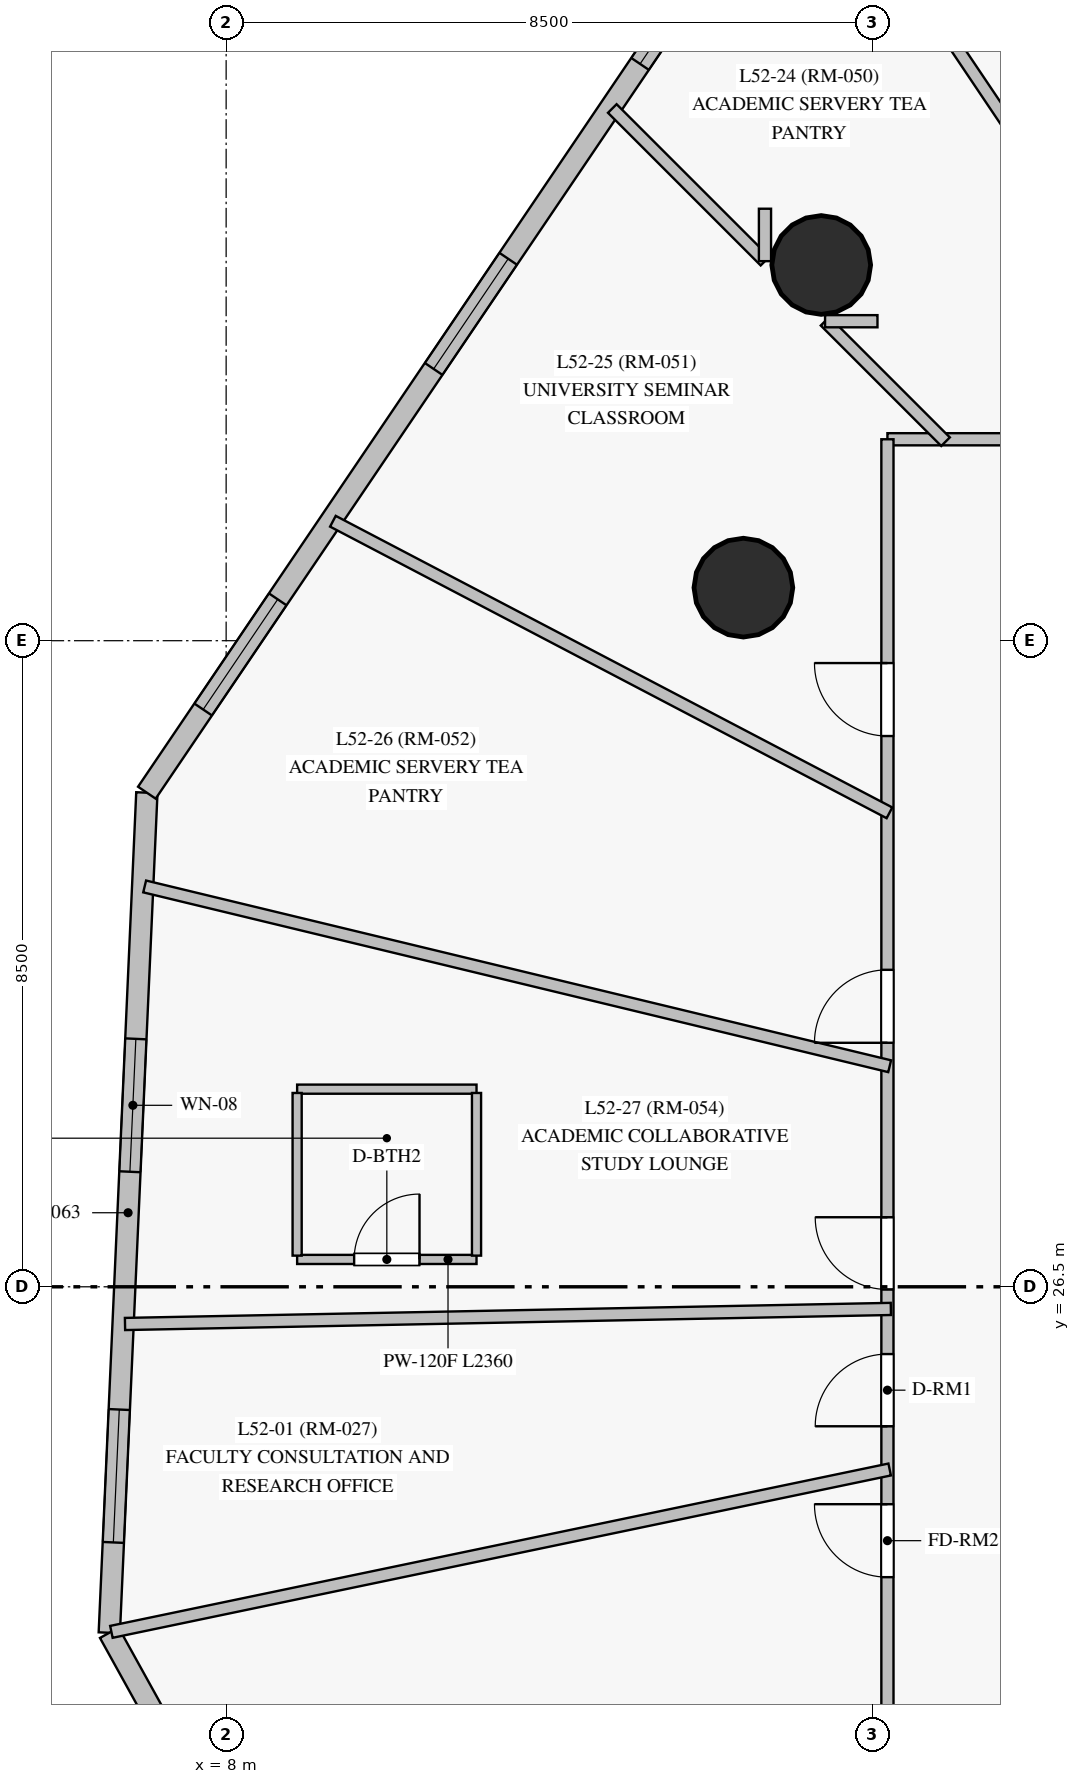
"""IFC4 building model, lengths in metres.
Left out: names, types, materials, properties, quantities, classifications, styles, units other than length and angle.
Written with IfcOpenShell. Run it as: python <this file> out.ifc"""

import sys

from ifc_helpers import new_model, si_unit, direction, frame, frame_2d, origin, origin_with_axes, origin_2d, place, context, subcontext, project, spatial, rectangle, circle, extrude, source, transform, mapped, element, fill, save


model = new_model("IFC4")
c1 = context("Model", 3, precision=1e-05, world=origin(), true_north=direction((0.0, 1.0)))
c2 = subcontext(c1, "Body", "Model", "MODEL_VIEW")
j1 = project(units=[si_unit("LENGTHUNIT", "METRE"), si_unit("PLANEANGLEUNIT", "RADIAN")], contexts=[c1])
p1 = place(None, origin())
s1 = spatial("IfcSite", under=j1, at=p1, CompositionType="ELEMENT")
p2 = place(p1, origin())
s2 = spatial("IfcBuilding", under=s1, at=p2, CompositionType="ELEMENT")
p3 = place(p2, frame((0.0, 0.0, 180.95)))
s3 = spatial("IfcBuildingStorey", under=s2, at=p3, CompositionType="ELEMENT", Elevation=180.95)
m1 = source(origin_with_axes(), c2, "Body", "SweptSolid", [
    extrude(circle(Radius=0.65, at=origin_2d()), origin(), (0.0, 0.0, 1.0), 3.05),
])
for number, where, z_axis, x_axis in (
    (1, (15.829, 39.943, 0.0), (0.0, 0.0, 1.0), (1.0, 0.0, 0.0)),
    (2, (14.805, 35.698, 0.0), (0.0, 0.0, 1.0), (1.0, 0.0, 0.0)),
):
    element("IfcColumn", number, at=place(p3, frame(where, z_axis=z_axis, x_axis=x_axis)), inside=s3, PredefinedType="COLUMN", context=c2, shape_type="MappedRepresentation", body=[
        mapped(m1, transform((0.0, 0.0, 0.0), scale=1.0)),
    ])
p4 = place(p3, frame((6.957, 33.0, 0.0), z_axis=(0.0, 0.0, 1.0), x_axis=(-0.04466588637, -0.999001981277, 0.0)))
e3 = element("IfcWall", 3, at=p4, inside=s3, PredefinedType="SOLIDWALL", context=c2, shape_type="SweptSolid", body=[
    extrude(rectangle(XDim=11.063, YDim=0.28, at=frame_2d((5.531, 0.0))), origin(), (0.0, 0.0, 1.0), 2.825),
])
p5 = place(p4, frame((3.242, 0.0, 0.85)))
e4 = element("IfcOpeningElement", 4, at=p5, cuts=e3, PredefinedType="OPENING", context=c2, shape_type="SweptSolid", body=[
    extrude(rectangle(XDim=1.75, YDim=1.65, at=frame_2d((0.875, 0.825))), frame((0.0, 0.15, 0.0), z_axis=(0.0, -1.0, 0.0), x_axis=(1.0, 0.0, 0.0)), (0.0, 0.0, 1.0), 0.3),
])
p6 = place(p4, frame((8.123, 0.0, 0.85)))
e5 = element("IfcOpeningElement", 5, at=p6, cuts=e3, PredefinedType="OPENING", context=c2, shape_type="SweptSolid", body=[
    extrude(rectangle(XDim=1.75, YDim=1.65, at=frame_2d((0.875, 0.825))), frame((0.0, 0.15, 0.0), z_axis=(0.0, -1.0, 0.0), x_axis=(1.0, 0.0, 0.0)), (0.0, 0.0, 1.0), 0.3),
])
p7 = place(p3, frame((6.463, 21.948, 0.0), z_axis=(0.0, 0.0, 1.0), x_axis=(0.484331046547, -0.874884813762, 0.0)))
e6 = element("IfcWall", 6, at=p7, inside=s3, PredefinedType="SOLIDWALL", context=c2, shape_type="SweptSolid", body=[
    extrude(rectangle(XDim=14.084, YDim=0.28, at=frame_2d((7.042, 0.0))), origin(), (0.0, 0.0, 1.0), 2.825),
])
p8 = place(p7, frame((1.457, 0.0, 0.85)))
e7 = element("IfcOpeningElement", 7, at=p8, cuts=e6, PredefinedType="OPENING", context=c2, shape_type="SweptSolid", body=[
    extrude(rectangle(XDim=1.75, YDim=1.65, at=frame_2d((0.875, 0.825))), frame((0.0, 0.15, 0.0), z_axis=(0.0, -1.0, 0.0), x_axis=(1.0, 0.0, 0.0)), (0.0, 0.0, 1.0), 0.3),
])
p9 = place(p7, frame((5.36, 0.0, 0.85)))
e8 = element("IfcOpeningElement", 8, at=p9, cuts=e6, PredefinedType="OPENING", context=c2, shape_type="SweptSolid", body=[
    extrude(rectangle(XDim=1.75, YDim=1.65, at=frame_2d((0.875, 0.825))), frame((0.0, 0.15, 0.0), z_axis=(0.0, -1.0, 0.0), x_axis=(1.0, 0.0, 0.0)), (0.0, 0.0, 1.0), 0.3),
])
p10 = place(p7, frame((10.391, 0.0, 0.85)))
e9 = element("IfcOpeningElement", 9, at=p10, cuts=e6, PredefinedType="OPENING", context=c2, shape_type="SweptSolid", body=[
    extrude(rectangle(XDim=1.75, YDim=1.65, at=frame_2d((0.875, 0.825))), frame((0.0, 0.15, 0.0), z_axis=(0.0, -1.0, 0.0), x_axis=(1.0, 0.0, 0.0)), (0.0, 0.0, 1.0), 0.3),
])
p11 = place(p3, frame((14.851, 44.665, 0.0), z_axis=(0.0, 0.0, 1.0), x_axis=(-0.560470947108, -0.828174086439, 0.0)))
e10 = element("IfcWall", 10, at=p11, inside=s3, PredefinedType="SOLIDWALL", context=c2, shape_type="SweptSolid", body=[
    extrude(rectangle(XDim=14.085, YDim=0.28, at=frame_2d((7.042, 0.0))), origin(), (0.0, 0.0, 1.0), 2.825),
])
p12 = place(p11, frame((0.757, 0.0, 0.85)))
e11 = element("IfcOpeningElement", 11, at=p12, cuts=e10, PredefinedType="OPENING", context=c2, shape_type="SweptSolid", body=[
    extrude(rectangle(XDim=1.75, YDim=1.65, at=frame_2d((0.875, 0.825))), frame((0.0, 0.15, 0.0), z_axis=(0.0, -1.0, 0.0), x_axis=(1.0, 0.0, 0.0)), (0.0, 0.0, 1.0), 0.3),
])
p13 = place(p11, frame((5.603, 0.0, 0.85)))
e12 = element("IfcOpeningElement", 12, at=p13, cuts=e10, PredefinedType="OPENING", context=c2, shape_type="SweptSolid", body=[
    extrude(rectangle(XDim=1.75, YDim=1.65, at=frame_2d((0.875, 0.825))), frame((0.0, 0.15, 0.0), z_axis=(0.0, -1.0, 0.0), x_axis=(1.0, 0.0, 0.0)), (0.0, 0.0, 1.0), 0.3),
])
p14 = place(p11, frame((11.013, 0.0, 0.85)))
e13 = element("IfcOpeningElement", 13, at=p14, cuts=e10, PredefinedType="OPENING", context=c2, shape_type="SweptSolid", body=[
    extrude(rectangle(XDim=1.75, YDim=1.65, at=frame_2d((0.875, 0.825))), frame((0.0, 0.15, 0.0), z_axis=(0.0, -1.0, 0.0), x_axis=(1.0, 0.0, 0.0)), (0.0, 0.0, 1.0), 0.3),
])
p15 = place(p3, frame((16.7, 37.65, 0.0), z_axis=(0.0, 0.0, 1.0), x_axis=(1.0, 0.0, 0.0)))
e14 = element("IfcWall", 14, at=p15, inside=s3, PredefinedType="PARTITIONING", context=c2, shape_type="SweptSolid", body=[
    extrude(rectangle(XDim=23.5, YDim=0.16, at=frame_2d((11.75, 0.0))), origin(), (0.0, 0.0, 1.0), 2.375),
])
p16 = place(p15, frame((20.759, 0.0, 0.0)))
e15 = element("IfcOpeningElement", 15, at=p16, cuts=e14, PredefinedType="OPENING", context=c2, shape_type="SweptSolid", body=[
    extrude(rectangle(XDim=0.96, YDim=2.15, at=frame_2d((0.48, 1.075))), frame((0.0, 0.09, 0.0), z_axis=(0.0, -1.0, 0.0), x_axis=(1.0, 0.0, 0.0)), (0.0, 0.0, 1.0), 0.18),
])
p17 = place(p15, frame((17.15, 0.0, 0.0)))
e16 = element("IfcOpeningElement", 16, at=p17, cuts=e14, PredefinedType="OPENING", context=c2, shape_type="SweptSolid", body=[
    extrude(rectangle(XDim=0.96, YDim=2.15, at=frame_2d((0.48, 1.075))), frame((0.0, 0.09, 0.0), z_axis=(0.0, -1.0, 0.0), x_axis=(1.0, 0.0, 0.0)), (0.0, 0.0, 1.0), 0.18),
])
p18 = place(p15, frame((14.8, 0.0, 0.0)))
e17 = element("IfcOpeningElement", 17, at=p18, cuts=e14, PredefinedType="OPENING", context=c2, shape_type="SweptSolid", body=[
    extrude(rectangle(XDim=0.95, YDim=2.15, at=frame_2d((0.475, 1.075))), frame((0.0, 0.09, 0.0), z_axis=(0.0, -1.0, 0.0), x_axis=(1.0, 0.0, 0.0)), (0.0, 0.0, 1.0), 0.18),
])
p19 = place(p15, frame((11.982, 0.0, 0.0)))
e18 = element("IfcOpeningElement", 18, at=p19, cuts=e14, PredefinedType="OPENING", context=c2, shape_type="SweptSolid", body=[
    extrude(rectangle(XDim=0.86, YDim=2.1, at=frame_2d((0.43, 1.05))), frame((0.0, 0.09, 0.0), z_axis=(0.0, -1.0, 0.0), x_axis=(1.0, 0.0, 0.0)), (0.0, 0.0, 1.0), 0.18),
])
p20 = place(p15, frame((10.885, 0.0, 0.0)))
e19 = element("IfcOpeningElement", 19, at=p20, cuts=e14, PredefinedType="OPENING", context=c2, shape_type="SweptSolid", body=[
    extrude(rectangle(XDim=0.95, YDim=2.15, at=frame_2d((0.475, 1.075))), frame((0.0, 0.09, 0.0), z_axis=(0.0, -1.0, 0.0), x_axis=(1.0, 0.0, 0.0)), (0.0, 0.0, 1.0), 0.18),
])
p21 = place(p15, frame((7.89, 0.0, 0.0)))
e20 = element("IfcOpeningElement", 20, at=p21, cuts=e14, PredefinedType="OPENING", context=c2, shape_type="SweptSolid", body=[
    extrude(rectangle(XDim=0.96, YDim=2.15, at=frame_2d((0.48, 1.075))), frame((0.0, 0.09, 0.0), z_axis=(0.0, -1.0, 0.0), x_axis=(1.0, 0.0, 0.0)), (0.0, 0.0, 1.0), 0.18),
])
p22 = place(p15, frame((5.4, 0.0, 0.0)))
e21 = element("IfcOpeningElement", 21, at=p22, cuts=e14, PredefinedType="OPENING", context=c2, shape_type="SweptSolid", body=[
    extrude(rectangle(XDim=0.96, YDim=2.15, at=frame_2d((0.48, 1.075))), frame((0.0, 0.09, 0.0), z_axis=(0.0, -1.0, 0.0), x_axis=(1.0, 0.0, 0.0)), (0.0, 0.0, 1.0), 0.18),
])
p23 = place(p15, frame((1.939, 0.0, 0.0)))
e22 = element("IfcOpeningElement", 22, at=p23, cuts=e14, PredefinedType="OPENING", context=c2, shape_type="SweptSolid", body=[
    extrude(rectangle(XDim=0.96, YDim=2.15, at=frame_2d((0.48, 1.075))), frame((0.0, 0.09, 0.0), z_axis=(0.0, -1.0, 0.0), x_axis=(1.0, 0.0, 0.0)), (0.0, 0.0, 1.0), 0.18),
])
p24 = place(p3, frame((16.7, 15.35, 0.0), z_axis=(0.0, 0.0, 1.0), x_axis=(0.0, 1.0, 0.0)))
e23 = element("IfcWall", 23, at=p24, inside=s3, PredefinedType="PARTITIONING", context=c2, shape_type="SweptSolid", body=[
    extrude(rectangle(XDim=22.3, YDim=0.16, at=frame_2d((11.15, 0.0))), origin(), (0.0, 0.0, 1.0), 2.275),
])
p25 = place(p24, frame((9.315, 0.0, 0.0)))
e24 = element("IfcOpeningElement", 24, at=p25, cuts=e23, PredefinedType="OPENING", context=c2, shape_type="SweptSolid", body=[
    extrude(rectangle(XDim=0.95, YDim=2.15, at=frame_2d((0.475, 1.075))), frame((0.0, 0.09, 0.0), z_axis=(0.0, -1.0, 0.0), x_axis=(1.0, 0.0, 0.0)), (0.0, 0.0, 1.0), 0.18),
])
p26 = place(p24, frame((7.33, 0.0, 0.0)))
e25 = element("IfcOpeningElement", 25, at=p26, cuts=e23, PredefinedType="OPENING", context=c2, shape_type="SweptSolid", body=[
    extrude(rectangle(XDim=0.96, YDim=2.15, at=frame_2d((0.48, 1.075))), frame((0.0, 0.09, 0.0), z_axis=(0.0, -1.0, 0.0), x_axis=(1.0, 0.0, 0.0)), (0.0, 0.0, 1.0), 0.18),
])
p27 = place(p24, frame((1.021, 0.0, 0.0)))
e26 = element("IfcOpeningElement", 26, at=p27, cuts=e23, PredefinedType="OPENING", context=c2, shape_type="SweptSolid", body=[
    extrude(rectangle(XDim=0.95, YDim=2.15, at=frame_2d((0.475, 1.075))), frame((0.0, 0.09, 0.0), z_axis=(0.0, -1.0, 0.0), x_axis=(1.0, 0.0, 0.0)), (0.0, 0.0, 1.0), 0.18),
])
p28 = place(p24, frame((18.396, 0.0, 0.0)))
e27 = element("IfcOpeningElement", 27, at=p28, cuts=e23, PredefinedType="OPENING", context=c2, shape_type="SweptSolid", body=[
    extrude(rectangle(XDim=0.96, YDim=2.15, at=frame_2d((0.48, 1.075))), frame((0.0, 0.09, 0.0), z_axis=(0.0, -1.0, 0.0), x_axis=(1.0, 0.0, 0.0)), (0.0, 0.0, 1.0), 0.18),
])
p29 = place(p24, frame((14.36, 0.0, 0.0)))
e28 = element("IfcOpeningElement", 28, at=p29, cuts=e23, PredefinedType="OPENING", context=c2, shape_type="SweptSolid", body=[
    extrude(rectangle(XDim=0.96, YDim=2.15, at=frame_2d((0.48, 1.075))), frame((0.0, 0.09, 0.0), z_axis=(0.0, -1.0, 0.0), x_axis=(1.0, 0.0, 0.0)), (0.0, 0.0, 1.0), 0.18),
])
p30 = place(p24, frame((11.115, 0.0, 0.0)))
e29 = element("IfcOpeningElement", 29, at=p30, cuts=e23, PredefinedType="OPENING", context=c2, shape_type="SweptSolid", body=[
    extrude(rectangle(XDim=0.95, YDim=2.15, at=frame_2d((0.475, 1.075))), frame((0.0, 0.09, 0.0), z_axis=(0.0, -1.0, 0.0), x_axis=(1.0, 0.0, 0.0)), (0.0, 0.0, 1.0), 0.18),
])
p31 = place(p3, frame((16.729, 24.096, 0.0), z_axis=(0.0, 0.0, 1.0), x_axis=(-0.978925817261, -0.204216170515, 0.0)))
e30 = element("IfcWall", 30, at=p31, inside=s3, PredefinedType="PARTITIONING", context=c2, shape_type="SweptSolid", body=[
    extrude(rectangle(XDim=10.459, YDim=0.16, at=frame_2d((5.23, 0.0))), origin(), (0.0, 0.0, 1.0), 2.825),
])
p32 = place(p3, frame((16.729, 29.402, 0.0), z_axis=(0.0, 0.0, 1.0), x_axis=(-0.97210105982, 0.234562421324, 0.0)))
e31 = element("IfcWall", 31, at=p32, inside=s3, PredefinedType="PARTITIONING", context=c2, shape_type="SweptSolid", body=[
    extrude(rectangle(XDim=10.083, YDim=0.16, at=frame_2d((5.041, 0.0))), origin(), (0.0, 0.0, 1.0), 2.825),
])
p33 = place(p3, frame((6.67, 26.011, 0.0), z_axis=(0.0, 0.0, 1.0), x_axis=(0.999806964113, 0.01964776098, 0.0)))
e32 = element("IfcWall", 32, at=p33, inside=s3, PredefinedType="PARTITIONING", context=c2, shape_type="SweptSolid", body=[
    extrude(rectangle(XDim=10.077, YDim=0.16, at=frame_2d((5.039, 0.0))), origin(), (0.0, 0.0, 1.0), 2.825),
])
p34 = place(p3, frame((21.099, 37.613, 0.0), z_axis=(0.0, 0.0, 1.0), x_axis=(-0.558064985306, 0.829797247631, 0.0)))
e33 = element("IfcWall", 33, at=p34, inside=s3, PredefinedType="PARTITIONING", context=c2, shape_type="SweptSolid", body=[
    extrude(rectangle(XDim=9.247, YDim=0.16, at=frame_2d((4.624, 0.0))), origin(), (0.0, 0.0, 1.0), 2.825),
])
p35 = place(p3, frame((16.727, 32.736, 0.0), z_axis=(0.0, 0.0, 1.0), x_axis=(-0.885802050451, 0.46406327954, 0.0)))
e34 = element("IfcWall", 34, at=p35, inside=s3, PredefinedType="PARTITIONING", context=c2, shape_type="SweptSolid", body=[
    extrude(rectangle(XDim=8.266, YDim=0.16, at=frame_2d((4.133, 0.0))), origin(), (0.0, 0.0, 1.0), 2.825),
])
p36 = place(p3, frame((15.089, 39.993, 0.0), z_axis=(0.0, 0.0, 1.0), x_axis=(-0.70723570156, 0.706977837304, 0.0)))
e35 = element("IfcWall", 35, at=p36, inside=s3, PredefinedType="PARTITIONING", context=c2, shape_type="SweptSolid", body=[
    extrude(rectangle(XDim=2.84, YDim=0.16, at=frame_2d((1.42, 0.0))), origin(), (0.0, 0.0, 1.0), 2.825),
])
p37 = place(p3, frame((8.934, 26.86, 0.0), z_axis=(0.0, 0.0, 1.0), x_axis=(1.0, 0.0, 0.0)))
e36 = element("IfcWall", 36, at=p37, inside=s3, PredefinedType="PARTITIONING", context=c2, shape_type="SweptSolid", body=[
    extrude(rectangle(XDim=2.36, YDim=0.12, at=frame_2d((1.18, 0.0))), origin(), (0.0, 0.0, 1.0), 2.825),
])
p38 = place(p37, frame((0.75, 0.0, 0.0)))
e37 = element("IfcOpeningElement", 37, at=p38, cuts=e36, PredefinedType="OPENING", context=c2, shape_type="SweptSolid", body=[
    extrude(rectangle(XDim=0.86, YDim=2.04, at=frame_2d((0.43, 1.02))), frame((0.0, 0.07, 0.0), z_axis=(0.0, -1.0, 0.0), x_axis=(1.0, 0.0, 0.0)), (0.0, 0.0, 1.0), 0.14),
])
p39 = place(p3, frame((11.294, 29.1, 0.0), z_axis=(0.0, 0.0, 1.0), x_axis=(-1.0, 0.0, 0.0)))
e38 = element("IfcWall", 38, at=p39, inside=s3, PredefinedType="PARTITIONING", context=c2, shape_type="SweptSolid", body=[
    extrude(rectangle(XDim=2.36, YDim=0.12, at=frame_2d((1.18, 0.0))), origin(), (0.0, 0.0, 1.0), 2.825),
])
p40 = place(p3, frame((17.465, 37.618, 0.0), z_axis=(0.0, 0.0, 1.0), x_axis=(-0.70721569251, 0.706997853085, 0.0)))
e39 = element("IfcWall", 39, at=p40, inside=s3, PredefinedType="PARTITIONING", context=c2, shape_type="SweptSolid", body=[
    extrude(rectangle(XDim=2.241, YDim=0.16, at=frame_2d((1.121, 0.0))), origin(), (0.0, 0.0, 1.0), 2.275),
])
for number, where, z_axis, x_axis in (
    (40, (11.294, 26.91, 0.0), (0.0, 0.0, 1.0), (0.0, 1.0, 0.0)),
    (41, (8.934, 29.05, 0.0), (0.0, 0.0, 1.0), (0.0, -1.0, 0.0)),
):
    element("IfcWall", number, at=place(p3, frame(where, z_axis=z_axis, x_axis=x_axis)), inside=s3, PredefinedType="PARTITIONING", context=c2, shape_type="SweptSolid", body=[
        extrude(rectangle(XDim=2.14, YDim=0.12, at=frame_2d((1.07, 0.0))), origin(), (0.0, 0.0, 1.0), 2.825),
    ])
p41 = place(p3, frame((15.089, 40.683, 0.0), z_axis=(0.0, 0.0, 1.0), x_axis=(0.0, -1.0, 0.0)))
e42 = element("IfcWall", 42, at=p41, inside=s3, PredefinedType="PARTITIONING", context=c2, shape_type="SweptSolid", body=[
    extrude(rectangle(XDim=0.69, YDim=0.16, at=frame_2d((0.345, 0.0))), origin(), (0.0, 0.0, 1.0), 2.825),
])
p42 = place(p3, frame((15.879, 39.203, 0.0), z_axis=(0.0, 0.0, 1.0), x_axis=(1.0, 0.0, 0.0)))
e43 = element("IfcWall", 43, at=p42, inside=s3, PredefinedType="PARTITIONING", context=c2, shape_type="SweptSolid", body=[
    extrude(rectangle(XDim=0.69, YDim=0.16, at=frame_2d((0.345, 0.0))), origin(), (0.0, 0.0, 1.0), 2.495),
])
m2 = source(origin_with_axes(), c2, "Body", "SweptSolid", [
    extrude(rectangle(XDim=1.75, YDim=1.65, at=frame_2d((0.875, 0.825))), frame((0.0, 0.03, 0.0), z_axis=(0.0, -1.0, 0.0), x_axis=(1.0, 0.0, 0.0)), (0.0, 0.0, 1.0), 0.06),
])
p43 = place(p5, origin())
e44 = element("IfcWindow", 44, at=p43, inside=s3, PartitioningType="SINGLE_PANEL", PredefinedType="WINDOW", context=c2, shape_type="MappedRepresentation", body=[
    mapped(m2, transform((0.0, 0.0, 0.0), scale=1.0)),
])
fill(e4, e44)
p44 = place(p6, origin())
e45 = element("IfcWindow", 45, at=p44, inside=s3, PartitioningType="SINGLE_PANEL", PredefinedType="WINDOW", context=c2, shape_type="MappedRepresentation", body=[
    mapped(m2, transform((0.0, 0.0, 0.0), scale=1.0)),
])
fill(e5, e45)
p45 = place(p12, origin())
e46 = element("IfcWindow", 46, at=p45, inside=s3, PartitioningType="SINGLE_PANEL", PredefinedType="WINDOW", context=c2, shape_type="MappedRepresentation", body=[
    mapped(m2, transform((0.0, 0.0, 0.0), scale=1.0)),
])
fill(e11, e46)
p46 = place(p13, origin())
e47 = element("IfcWindow", 47, at=p46, inside=s3, PartitioningType="SINGLE_PANEL", PredefinedType="WINDOW", context=c2, shape_type="MappedRepresentation", body=[
    mapped(m2, transform((0.0, 0.0, 0.0), scale=1.0)),
])
fill(e12, e47)
p47 = place(p14, origin())
e48 = element("IfcWindow", 48, at=p47, inside=s3, PartitioningType="SINGLE_PANEL", PredefinedType="WINDOW", context=c2, shape_type="MappedRepresentation", body=[
    mapped(m2, transform((0.0, 0.0, 0.0), scale=1.0)),
])
fill(e13, e48)
m3 = source(origin_with_axes(), c2, "Body", "SweptSolid", [
    extrude(rectangle(XDim=0.86, YDim=2.04, at=frame_2d((0.43, 1.02))), frame((0.0, 0.025, 0.0), z_axis=(0.0, -1.0, 0.0), x_axis=(1.0, 0.0, 0.0)), (0.0, 0.0, 1.0), 0.05),
])
p48 = place(p38, origin())
e49 = element("IfcDoor", 49, at=p48, inside=s3, OperationType="SINGLE_SWING_RIGHT", PredefinedType="DOOR", context=c2, shape_type="MappedRepresentation", body=[
    mapped(m3, transform((0.0, 0.0, 0.0), scale=1.0)),
])
fill(e37, e49)
m4 = source(origin_with_axes(), c2, "Body", "SweptSolid", [
    extrude(rectangle(XDim=0.95, YDim=2.15, at=frame_2d((0.475, 1.075))), frame((0.0, 0.025, 0.0), z_axis=(0.0, -1.0, 0.0), x_axis=(1.0, 0.0, 0.0)), (0.0, 0.0, 1.0), 0.05),
])
p49 = place(p25, origin())
e50 = element("IfcDoor", 50, at=p49, inside=s3, OperationType="SINGLE_SWING_LEFT", PredefinedType="DOOR", context=c2, shape_type="MappedRepresentation", body=[
    mapped(m4, transform((0.0, 0.0, 0.0), scale=1.0)),
])
fill(e24, e50)
m5 = source(origin_with_axes(), c2, "Body", "SweptSolid", [
    extrude(rectangle(XDim=0.96, YDim=2.15, at=frame_2d((0.48, 1.075))), frame((0.0, 0.025, 0.0), z_axis=(0.0, -1.0, 0.0), x_axis=(1.0, 0.0, 0.0)), (0.0, 0.0, 1.0), 0.05),
])
p50 = place(p26, origin())
e51 = element("IfcDoor", 51, at=p50, inside=s3, OperationType="SINGLE_SWING_RIGHT", PredefinedType="DOOR", context=c2, shape_type="MappedRepresentation", body=[
    mapped(m5, transform((0.0, 0.0, 0.0), scale=1.0)),
])
fill(e25, e51)
p51 = place(p28, origin())
e52 = element("IfcDoor", 52, at=p51, inside=s3, OperationType="SINGLE_SWING_RIGHT", PredefinedType="DOOR", context=c2, shape_type="MappedRepresentation", body=[
    mapped(m5, transform((0.0, 0.0, 0.0), scale=1.0)),
])
fill(e27, e52)
p52 = place(p29, origin())
e53 = element("IfcDoor", 53, at=p52, inside=s3, OperationType="SINGLE_SWING_LEFT", PredefinedType="DOOR", context=c2, shape_type="MappedRepresentation", body=[
    mapped(m5, transform((0.0, 0.0, 0.0), scale=1.0)),
])
fill(e28, e53)
p53 = place(p30, origin())
e54 = element("IfcDoor", 54, at=p53, inside=s3, OperationType="SINGLE_SWING_RIGHT", PredefinedType="DOOR", context=c2, shape_type="MappedRepresentation", body=[
    mapped(m4, transform((0.0, 0.0, 0.0), scale=1.0)),
])
fill(e29, e54)
save(model, sys.argv[1])
